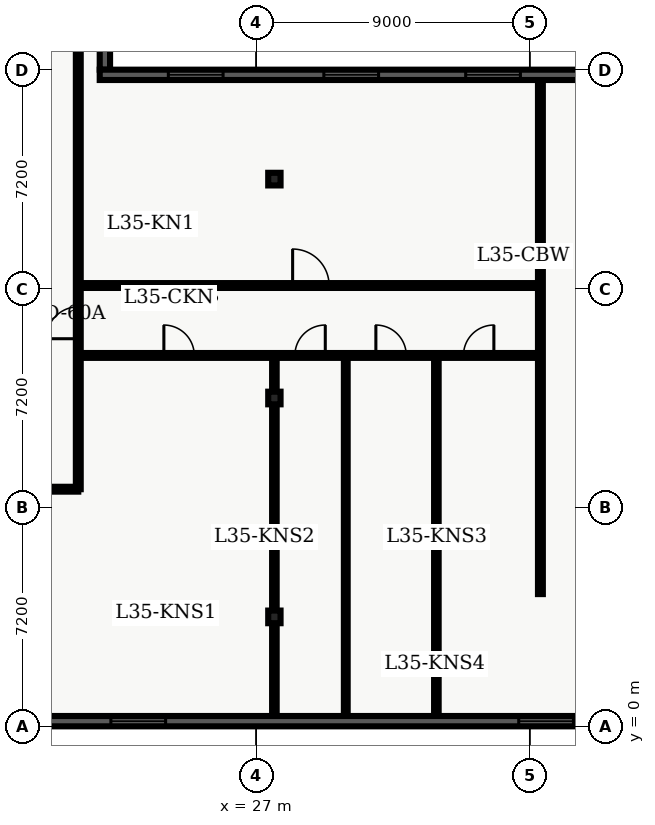
"""IFC4 building model, lengths in metres.
Left out: names, types, materials, properties, quantities, classifications, styles, units other than length and angle.
Written with IfcOpenShell. Run it as: python <this file> out.ifc"""

import sys

from ifc_helpers import new_model, entity, si_unit, converted_unit, direction, frame, origin_with_axes, origin_2d_with_axis, place, context, subcontext, project, spatial, polyline, rectangle, i_section, outline, extrude, element, fill, save


model = new_model("IFC4")
c1 = context("Model", 3, precision=1e-05, world=origin_with_axes(), true_north=direction((0.0, 1.0)))
c2 = subcontext(c1, "Body", "Model", "MODEL_VIEW")
j1 = project(units=[si_unit("LENGTHUNIT", "METRE"), converted_unit("PLANEANGLEUNIT", "DEGREE", entity("IfcPlaneAngleMeasure", 0.017), si_unit("PLANEANGLEUNIT", "RADIAN"), dimensions=[0, 0, 0, 0, 0, 0, 0])], contexts=[c1])
p1 = place(None, origin_with_axes())
s1 = spatial("IfcSite", under=j1, at=p1, CompositionType="ELEMENT")
p2 = place(p1, origin_with_axes())
s2 = spatial("IfcBuilding", under=s1, at=p2, CompositionType="ELEMENT")
p3 = place(p2, frame((0.0, 0.0, 144.6), z_axis=(0.0, 0.0, 1.0), x_axis=(1.0, 0.0, 0.0)))
s3 = spatial("IfcBuildingStorey", under=s2, at=p3, CompositionType="ELEMENT", Elevation=144.6)
for number, where, z_axis, x_axis in (
    (1, (27.6, 3.6, 0.0), (0.0, 0.0, 1.0), (1.0, 0.0, 0.0)),
    (2, (27.6, 10.8, 0.0), (0.0, 0.0, 1.0), (1.0, 0.0, 0.0)),
    (3, (27.6, 18.0, 0.0), (0.0, 0.0, 1.0), (1.0, 0.0, 0.0)),
):
    element("IfcColumn", number, at=place(p3, frame(where, z_axis=z_axis, x_axis=x_axis)), inside=s3, PredefinedType="COLUMN", context=c2, shape_type="SweptSolid", body=[
        extrude(i_section(OverallWidth=0.406, OverallDepth=0.416, WebThickness=0.03, FlangeThickness=0.048, FilletRadius=0.022, at=origin_2d_with_axis()), origin_with_axes(), (0.0, 0.0, 1.0), 3.9),
    ])
p4 = place(p3, frame((2.6, 7.8, 0.0), z_axis=(0.0, 0.0, 1.0), x_axis=(1.0, 0.0, 0.0)))
e4 = element("IfcWall", 4, at=p4, inside=s3, PredefinedType="PARTITIONING", context=c2, shape_type="SweptSolid", body=[
    extrude(outline(polyline([(0.0, -0.08), (18.55, -0.08), (18.55, 0.08), (0.0, 0.08), (0.0, -0.08)])), origin_with_axes(), (0.0, 0.0, 1.0), 2.7),
])
p5 = place(p4, frame((9.245, 0.0, 0.0), z_axis=(0.0, 0.0, 1.0), x_axis=(1.0, 0.0, 0.0)))
e5 = element("IfcOpeningElement", 5, at=p5, cuts=e4, PredefinedType="OPENING", context=c2, shape_type="SweptSolid", body=[
    extrude(rectangle(XDim=1.2, YDim=0.18, at=origin_2d_with_axis()), origin_with_axes(), (0.0, 0.0, 1.0), 2.2),
])
p6 = place(p3, frame((21.15, 7.8, 0.0), z_axis=(0.0, 0.0, 1.0), x_axis=(0.0, 1.0, 0.0)))
e6 = element("IfcWall", 6, at=p6, inside=s3, PredefinedType="PARTITIONING", context=c2, shape_type="SweptSolid", body=[
    extrude(outline(polyline([(0.0, -0.08), (32.7, -0.08), (32.7, 0.08), (0.0, 0.08), (0.0, -0.08)])), origin_with_axes(), (0.0, 0.0, 1.0), 2.7),
])
p7 = place(p6, frame((5.475, 0.0, 0.0), z_axis=(0.0, 0.0, 1.0), x_axis=(1.0, 0.0, 0.0)))
e7 = element("IfcOpeningElement", 7, at=p7, cuts=e6, PredefinedType="OPENING", context=c2, shape_type="SweptSolid", body=[
    extrude(rectangle(XDim=1.05, YDim=0.18, at=origin_2d_with_axis()), origin_with_axes(), (0.0, 0.0, 1.0), 2.15),
])
p8 = place(p3, frame((21.15, 12.2, 0.0), z_axis=(0.0, 0.0, 1.0), x_axis=(1.0, 0.0, 0.0)))
e8 = element("IfcWall", 8, at=p8, inside=s3, PredefinedType="PARTITIONING", context=c2, shape_type="SweptSolid", body=[
    extrude(outline(polyline([(0.0, -0.08), (15.2, -0.08), (15.2, 0.08), (0.0, 0.08), (0.0, -0.08)])), origin_with_axes(), (0.0, 0.0, 1.0), 2.7),
])
p9 = place(p8, frame((3.315, 0.0, 0.0), z_axis=(0.0, 0.0, 1.0), x_axis=(1.0, 0.0, 0.0)))
e9 = element("IfcOpeningElement", 9, at=p9, cuts=e8, PredefinedType="OPENING", context=c2, shape_type="SweptSolid", body=[
    extrude(rectangle(XDim=1.0, YDim=0.18, at=origin_2d_with_axis()), origin_with_axes(), (0.0, 0.0, 1.0), 2.15),
])
p10 = place(p8, frame((7.624, 0.0, 0.0), z_axis=(0.0, 0.0, 1.0), x_axis=(1.0, 0.0, 0.0)))
e10 = element("IfcOpeningElement", 10, at=p10, cuts=e8, PredefinedType="OPENING", context=c2, shape_type="SweptSolid", body=[
    extrude(rectangle(XDim=1.0, YDim=0.18, at=origin_2d_with_axis()), origin_with_axes(), (0.0, 0.0, 1.0), 2.15),
])
p11 = place(p8, frame((10.288, 0.0, 0.0), z_axis=(0.0, 0.0, 1.0), x_axis=(1.0, 0.0, 0.0)))
e11 = element("IfcOpeningElement", 11, at=p11, cuts=e8, PredefinedType="OPENING", context=c2, shape_type="SweptSolid", body=[
    extrude(rectangle(XDim=1.0, YDim=0.18, at=origin_2d_with_axis()), origin_with_axes(), (0.0, 0.0, 1.0), 2.15),
])
p12 = place(p8, frame((13.169, 0.0, 0.0), z_axis=(0.0, 0.0, 1.0), x_axis=(1.0, 0.0, 0.0)))
e12 = element("IfcOpeningElement", 12, at=p12, cuts=e8, PredefinedType="OPENING", context=c2, shape_type="SweptSolid", body=[
    extrude(rectangle(XDim=1.0, YDim=0.18, at=origin_2d_with_axis()), origin_with_axes(), (0.0, 0.0, 1.0), 2.15),
])
p13 = place(p3, frame((21.15, 14.5, 0.0), z_axis=(0.0, 0.0, 1.0), x_axis=(1.0, 0.0, 0.0)))
e13 = element("IfcWall", 13, at=p13, inside=s3, PredefinedType="PARTITIONING", context=c2, shape_type="SweptSolid", body=[
    extrude(outline(polyline([(0.0, -0.08), (15.2, -0.08), (15.2, 0.08), (0.0, 0.08), (0.0, -0.08)])), origin_with_axes(), (0.0, 0.0, 1.0), 2.7),
])
p14 = place(p13, frame((7.65, 0.0, 0.0), z_axis=(0.0, 0.0, 1.0), x_axis=(1.0, 0.0, 0.0)))
e14 = element("IfcOpeningElement", 14, at=p14, cuts=e13, PredefinedType="OPENING", context=c2, shape_type="SweptSolid", body=[
    extrude(rectangle(XDim=1.2, YDim=0.18, at=origin_2d_with_axis()), origin_with_axes(), (0.0, 0.0, 1.0), 2.2),
])
p15 = place(p3, frame((36.35, 4.35, 0.0), z_axis=(0.0, 0.0, 1.0), x_axis=(0.0, 1.0, 0.0)))
e15 = element("IfcWall", 15, at=p15, inside=s3, PredefinedType="PARTITIONING", context=c2, shape_type="SweptSolid", body=[
    extrude(outline(polyline([(0.0, -0.08), (16.95, -0.08), (16.95, 0.08), (0.0, 0.08), (0.0, -0.08)])), origin_with_axes(), (0.0, 0.0, 1.0), 2.7),
])
p16 = place(p3, frame((27.6, 0.335, 0.0), z_axis=(0.0, 0.0, 1.0), x_axis=(0.0, 1.0, 0.0)))
e16 = element("IfcWall", 16, at=p16, inside=s3, PredefinedType="PARTITIONING", context=c2, shape_type="SweptSolid", body=[
    extrude(outline(polyline([(0.0, -0.075), (11.745, -0.075), (11.745, 0.075), (0.0, 0.075), (0.0, -0.075)])), origin_with_axes(), (0.0, 0.0, 1.0), 2.7),
])
p17 = place(p3, frame((29.948, 0.335, 0.0), z_axis=(0.0, 0.0, 1.0), x_axis=(0.0, 1.0, 0.0)))
e17 = element("IfcWall", 17, at=p17, inside=s3, PredefinedType="PARTITIONING", context=c2, shape_type="SweptSolid", body=[
    extrude(outline(polyline([(0.0, -0.062), (11.745, -0.062), (11.745, 0.062), (0.0, 0.062), (0.0, -0.062)])), origin_with_axes(), (0.0, 0.0, 1.0), 2.7),
])
p18 = place(p3, frame((32.928, 0.335, 0.0), z_axis=(0.0, 0.0, 1.0), x_axis=(0.0, 1.0, 0.0)))
e18 = element("IfcWall", 18, at=p18, inside=s3, PredefinedType="PARTITIONING", context=c2, shape_type="SweptSolid", body=[
    extrude(outline(polyline([(0.0, -0.075), (11.745, -0.075), (11.745, 0.075), (0.0, 0.075), (0.0, -0.075)])), origin_with_axes(), (0.0, 0.0, 1.0), 2.7),
])
p19 = place(p3, frame((57.26, 0.17, 0.0), z_axis=(0.0, 0.0, 1.0), x_axis=(-1.0, 0.0, 0.0)))
e19 = element("IfcWall", 19, at=p19, inside=s3, PredefinedType="SOLIDWALL", context=c2, shape_type="SweptSolid", body=[
    extrude(outline(polyline([(0.0, -0.17), (54.86, -0.17), (54.86, 0.17), (0.0, 0.17), (0.0, -0.17)])), origin_with_axes(), (0.0, 0.0, 1.0), 3.66),
])
p20 = place(p19, frame((2.836, 0.0, 0.45), z_axis=(0.0, 0.0, 1.0), x_axis=(1.0, 0.0, 0.0)))
e20 = element("IfcOpeningElement", 20, at=p20, cuts=e19, PredefinedType="OPENING", context=c2, shape_type="SweptSolid", body=[
    extrude(rectangle(XDim=1.8, YDim=0.36, at=origin_2d_with_axis()), origin_with_axes(), (0.0, 0.0, 1.0), 2.1),
])
p21 = place(p19, frame((7.307, 0.0, 0.45), z_axis=(0.0, 0.0, 1.0), x_axis=(1.0, 0.0, 0.0)))
e21 = element("IfcOpeningElement", 21, at=p21, cuts=e19, PredefinedType="OPENING", context=c2, shape_type="SweptSolid", body=[
    extrude(rectangle(XDim=1.8, YDim=0.36, at=origin_2d_with_axis()), origin_with_axes(), (0.0, 0.0, 1.0), 2.1),
])
p22 = place(p19, frame((11.779, 0.0, 0.45), z_axis=(0.0, 0.0, 1.0), x_axis=(1.0, 0.0, 0.0)))
e22 = element("IfcOpeningElement", 22, at=p22, cuts=e19, PredefinedType="OPENING", context=c2, shape_type="SweptSolid", body=[
    extrude(rectangle(XDim=1.8, YDim=0.36, at=origin_2d_with_axis()), origin_with_axes(), (0.0, 0.0, 1.0), 2.1),
])
p23 = place(p19, frame((16.251, 0.0, 0.45), z_axis=(0.0, 0.0, 1.0), x_axis=(1.0, 0.0, 0.0)))
e23 = element("IfcOpeningElement", 23, at=p23, cuts=e19, PredefinedType="OPENING", context=c2, shape_type="SweptSolid", body=[
    extrude(rectangle(XDim=1.8, YDim=0.36, at=origin_2d_with_axis()), origin_with_axes(), (0.0, 0.0, 1.0), 2.1),
])
p24 = place(p19, frame((20.723, 0.0, 0.45), z_axis=(0.0, 0.0, 1.0), x_axis=(1.0, 0.0, 0.0)))
e24 = element("IfcOpeningElement", 24, at=p24, cuts=e19, PredefinedType="OPENING", context=c2, shape_type="SweptSolid", body=[
    extrude(rectangle(XDim=1.8, YDim=0.36, at=origin_2d_with_axis()), origin_with_axes(), (0.0, 0.0, 1.0), 2.1),
])
p25 = place(p19, frame((34.138, 0.0, 0.45), z_axis=(0.0, 0.0, 1.0), x_axis=(1.0, 0.0, 0.0)))
e25 = element("IfcOpeningElement", 25, at=p25, cuts=e19, PredefinedType="OPENING", context=c2, shape_type="SweptSolid", body=[
    extrude(rectangle(XDim=1.8, YDim=0.36, at=origin_2d_with_axis()), origin_with_axes(), (0.0, 0.0, 1.0), 2.1),
])
p26 = place(p19, frame((38.609, 0.0, 0.45), z_axis=(0.0, 0.0, 1.0), x_axis=(1.0, 0.0, 0.0)))
e26 = element("IfcOpeningElement", 26, at=p26, cuts=e19, PredefinedType="OPENING", context=c2, shape_type="SweptSolid", body=[
    extrude(rectangle(XDim=1.8, YDim=0.36, at=origin_2d_with_axis()), origin_with_axes(), (0.0, 0.0, 1.0), 2.1),
])
p27 = place(p19, frame((43.081, 0.0, 0.45), z_axis=(0.0, 0.0, 1.0), x_axis=(1.0, 0.0, 0.0)))
e27 = element("IfcOpeningElement", 27, at=p27, cuts=e19, PredefinedType="OPENING", context=c2, shape_type="SweptSolid", body=[
    extrude(rectangle(XDim=1.8, YDim=0.36, at=origin_2d_with_axis()), origin_with_axes(), (0.0, 0.0, 1.0), 2.1),
])
p28 = place(p19, frame((47.553, 0.0, 0.45), z_axis=(0.0, 0.0, 1.0), x_axis=(1.0, 0.0, 0.0)))
e28 = element("IfcOpeningElement", 28, at=p28, cuts=e19, PredefinedType="OPENING", context=c2, shape_type="SweptSolid", body=[
    extrude(rectangle(XDim=1.8, YDim=0.36, at=origin_2d_with_axis()), origin_with_axes(), (0.0, 0.0, 1.0), 2.1),
])
p29 = place(p19, frame((52.024, 0.0, 0.45), z_axis=(0.0, 0.0, 1.0), x_axis=(1.0, 0.0, 0.0)))
e29 = element("IfcOpeningElement", 29, at=p29, cuts=e19, PredefinedType="OPENING", context=c2, shape_type="SweptSolid", body=[
    extrude(rectangle(XDim=1.8, YDim=0.36, at=origin_2d_with_axis()), origin_with_axes(), (0.0, 0.0, 1.0), 2.1),
])
p30 = place(p3, frame((22.025, 46.34, 0.0), z_axis=(0.0, 0.0, 1.0), x_axis=(0.0, -1.0, 0.0)))
e30 = element("IfcWall", 30, at=p30, inside=s3, PredefinedType="SOLIDWALL", context=c2, shape_type="SweptSolid", body=[
    extrude(outline(polyline([(0.0, -0.17), (24.74, -0.17), (24.74, 0.17), (0.0, 0.17), (0.0, -0.17)])), origin_with_axes(), (0.0, 0.0, 1.0), 3.66),
])
p31 = place(p30, frame((2.954, 0.0, 0.45), z_axis=(0.0, 0.0, 1.0), x_axis=(1.0, 0.0, 0.0)))
e31 = element("IfcOpeningElement", 31, at=p31, cuts=e30, PredefinedType="OPENING", context=c2, shape_type="SweptSolid", body=[
    extrude(rectangle(XDim=1.6, YDim=0.36, at=origin_2d_with_axis()), origin_with_axes(), (0.0, 0.0, 1.0), 2.2),
])
p32 = place(p30, frame((7.662, 0.0, 0.45), z_axis=(0.0, 0.0, 1.0), x_axis=(1.0, 0.0, 0.0)))
e32 = element("IfcOpeningElement", 32, at=p32, cuts=e30, PredefinedType="OPENING", context=c2, shape_type="SweptSolid", body=[
    extrude(rectangle(XDim=1.6, YDim=0.36, at=origin_2d_with_axis()), origin_with_axes(), (0.0, 0.0, 1.0), 2.2),
])
p33 = place(p30, frame((12.37, 0.0, 0.45), z_axis=(0.0, 0.0, 1.0), x_axis=(1.0, 0.0, 0.0)))
e33 = element("IfcOpeningElement", 33, at=p33, cuts=e30, PredefinedType="OPENING", context=c2, shape_type="SweptSolid", body=[
    extrude(rectangle(XDim=1.6, YDim=0.36, at=origin_2d_with_axis()), origin_with_axes(), (0.0, 0.0, 1.0), 2.2),
])
p34 = place(p30, frame((17.078, 0.0, 0.45), z_axis=(0.0, 0.0, 1.0), x_axis=(1.0, 0.0, 0.0)))
e34 = element("IfcOpeningElement", 34, at=p34, cuts=e30, PredefinedType="OPENING", context=c2, shape_type="SweptSolid", body=[
    extrude(rectangle(XDim=1.6, YDim=0.36, at=origin_2d_with_axis()), origin_with_axes(), (0.0, 0.0, 1.0), 2.2),
])
p35 = place(p30, frame((21.786, 0.0, 0.45), z_axis=(0.0, 0.0, 1.0), x_axis=(1.0, 0.0, 0.0)))
e35 = element("IfcOpeningElement", 35, at=p35, cuts=e30, PredefinedType="OPENING", context=c2, shape_type="SweptSolid", body=[
    extrude(rectangle(XDim=1.6, YDim=0.36, at=origin_2d_with_axis()), origin_with_axes(), (0.0, 0.0, 1.0), 2.2),
])
p36 = place(p3, frame((21.855, 21.43, 0.0), z_axis=(0.0, 0.0, 1.0), x_axis=(1.0, 0.0, 0.0)))
e36 = element("IfcWall", 36, at=p36, inside=s3, PredefinedType="SOLIDWALL", context=c2, shape_type="SweptSolid", body=[
    extrude(outline(polyline([(0.0, -0.17), (16.545, -0.17), (16.545, 0.17), (0.0, 0.17), (0.0, -0.17)])), origin_with_axes(), (0.0, 0.0, 1.0), 3.66),
])
p37 = place(p36, frame((3.157, 0.0, 0.45), z_axis=(0.0, 0.0, 1.0), x_axis=(1.0, 0.0, 0.0)))
e37 = element("IfcOpeningElement", 37, at=p37, cuts=e36, PredefinedType="OPENING", context=c2, shape_type="SweptSolid", body=[
    extrude(rectangle(XDim=1.8, YDim=0.36, at=origin_2d_with_axis()), origin_with_axes(), (0.0, 0.0, 1.0), 2.1),
])
p38 = place(p36, frame((8.272, 0.0, 0.45), z_axis=(0.0, 0.0, 1.0), x_axis=(1.0, 0.0, 0.0)))
e38 = element("IfcOpeningElement", 38, at=p38, cuts=e36, PredefinedType="OPENING", context=c2, shape_type="SweptSolid", body=[
    extrude(rectangle(XDim=1.8, YDim=0.36, at=origin_2d_with_axis()), origin_with_axes(), (0.0, 0.0, 1.0), 2.1),
])
p39 = place(p36, frame((12.937, 0.0, 0.45), z_axis=(0.0, 0.0, 1.0), x_axis=(1.0, 0.0, 0.0)))
e39 = element("IfcOpeningElement", 39, at=p39, cuts=e36, PredefinedType="OPENING", context=c2, shape_type="SweptSolid", body=[
    extrude(rectangle(XDim=1.8, YDim=0.36, at=origin_2d_with_axis()), origin_with_axes(), (0.0, 0.0, 1.0), 2.1),
])
p40 = place(p6, frame((5.475, 0.0, 0.0), z_axis=(0.0, 0.0, 1.0), x_axis=(1.0, 0.0, 0.0)))
e40 = element("IfcDoor", 40, at=p40, inside=s3, OperationType="SINGLE_SWING_LEFT", PredefinedType="DOOR", context=c2, shape_type="SweptSolid", body=[
    extrude(rectangle(XDim=1.05, YDim=0.09, at=origin_2d_with_axis()), origin_with_axes(), (0.0, 0.0, 1.0), 2.15),
])
fill(e7, e40)
p41 = place(p8, frame((3.315, 0.0, 0.0), z_axis=(0.0, 0.0, 1.0), x_axis=(1.0, 0.0, 0.0)))
e41 = element("IfcDoor", 41, at=p41, inside=s3, OperationType="SINGLE_SWING_LEFT", PredefinedType="DOOR", context=c2, shape_type="SweptSolid", body=[
    extrude(rectangle(XDim=1.0, YDim=0.09, at=origin_2d_with_axis()), origin_with_axes(), (0.0, 0.0, 1.0), 2.15),
])
fill(e9, e41)
p42 = place(p8, frame((7.624, 0.0, 0.0), z_axis=(0.0, 0.0, 1.0), x_axis=(1.0, 0.0, 0.0)))
e42 = element("IfcDoor", 42, at=p42, inside=s3, OperationType="SINGLE_SWING_RIGHT", PredefinedType="DOOR", context=c2, shape_type="SweptSolid", body=[
    extrude(rectangle(XDim=1.0, YDim=0.09, at=origin_2d_with_axis()), origin_with_axes(), (0.0, 0.0, 1.0), 2.15),
])
fill(e10, e42)
p43 = place(p8, frame((10.288, 0.0, 0.0), z_axis=(0.0, 0.0, 1.0), x_axis=(1.0, 0.0, 0.0)))
e43 = element("IfcDoor", 43, at=p43, inside=s3, OperationType="SINGLE_SWING_LEFT", PredefinedType="DOOR", context=c2, shape_type="SweptSolid", body=[
    extrude(rectangle(XDim=1.0, YDim=0.09, at=origin_2d_with_axis()), origin_with_axes(), (0.0, 0.0, 1.0), 2.15),
])
fill(e11, e43)
p44 = place(p8, frame((13.169, 0.0, 0.0), z_axis=(0.0, 0.0, 1.0), x_axis=(1.0, 0.0, 0.0)))
e44 = element("IfcDoor", 44, at=p44, inside=s3, OperationType="SINGLE_SWING_RIGHT", PredefinedType="DOOR", context=c2, shape_type="SweptSolid", body=[
    extrude(rectangle(XDim=1.0, YDim=0.09, at=origin_2d_with_axis()), origin_with_axes(), (0.0, 0.0, 1.0), 2.15),
])
fill(e12, e44)
p45 = place(p13, frame((7.65, 0.0, 0.0), z_axis=(0.0, 0.0, 1.0), x_axis=(1.0, 0.0, 0.0)))
e45 = element("IfcDoor", 45, at=p45, inside=s3, OperationType="SINGLE_SWING_LEFT", PredefinedType="DOOR", context=c2, shape_type="SweptSolid", body=[
    extrude(rectangle(XDim=1.2, YDim=0.09, at=origin_2d_with_axis()), origin_with_axes(), (0.0, 0.0, 1.0), 2.2),
])
fill(e14, e45)
p46 = place(p19, frame((20.723, 0.0, 0.45), z_axis=(0.0, 0.0, 1.0), x_axis=(1.0, 0.0, 0.0)))
e46 = element("IfcWindow", 46, at=p46, inside=s3, PredefinedType="WINDOW", context=c2, shape_type="SweptSolid", body=[
    extrude(rectangle(XDim=1.8, YDim=0.09, at=origin_2d_with_axis()), origin_with_axes(), (0.0, 0.0, 1.0), 2.1),
])
fill(e24, e46)
p47 = place(p19, frame((34.138, 0.0, 0.45), z_axis=(0.0, 0.0, 1.0), x_axis=(1.0, 0.0, 0.0)))
e47 = element("IfcWindow", 47, at=p47, inside=s3, PredefinedType="WINDOW", context=c2, shape_type="SweptSolid", body=[
    extrude(rectangle(XDim=1.8, YDim=0.09, at=origin_2d_with_axis()), origin_with_axes(), (0.0, 0.0, 1.0), 2.1),
])
fill(e25, e47)
p48 = place(p36, frame((3.157, 0.0, 0.45), z_axis=(0.0, 0.0, 1.0), x_axis=(1.0, 0.0, 0.0)))
e48 = element("IfcWindow", 48, at=p48, inside=s3, PredefinedType="WINDOW", context=c2, shape_type="SweptSolid", body=[
    extrude(rectangle(XDim=1.8, YDim=0.09, at=origin_2d_with_axis()), origin_with_axes(), (0.0, 0.0, 1.0), 2.1),
])
fill(e37, e48)
p49 = place(p36, frame((8.272, 0.0, 0.45), z_axis=(0.0, 0.0, 1.0), x_axis=(1.0, 0.0, 0.0)))
e49 = element("IfcWindow", 49, at=p49, inside=s3, PredefinedType="WINDOW", context=c2, shape_type="SweptSolid", body=[
    extrude(rectangle(XDim=1.8, YDim=0.09, at=origin_2d_with_axis()), origin_with_axes(), (0.0, 0.0, 1.0), 2.1),
])
fill(e38, e49)
p50 = place(p36, frame((12.937, 0.0, 0.45), z_axis=(0.0, 0.0, 1.0), x_axis=(1.0, 0.0, 0.0)))
e50 = element("IfcWindow", 50, at=p50, inside=s3, PredefinedType="WINDOW", context=c2, shape_type="SweptSolid", body=[
    extrude(rectangle(XDim=1.8, YDim=0.09, at=origin_2d_with_axis()), origin_with_axes(), (0.0, 0.0, 1.0), 2.1),
])
fill(e39, e50)
save(model, sys.argv[1])
